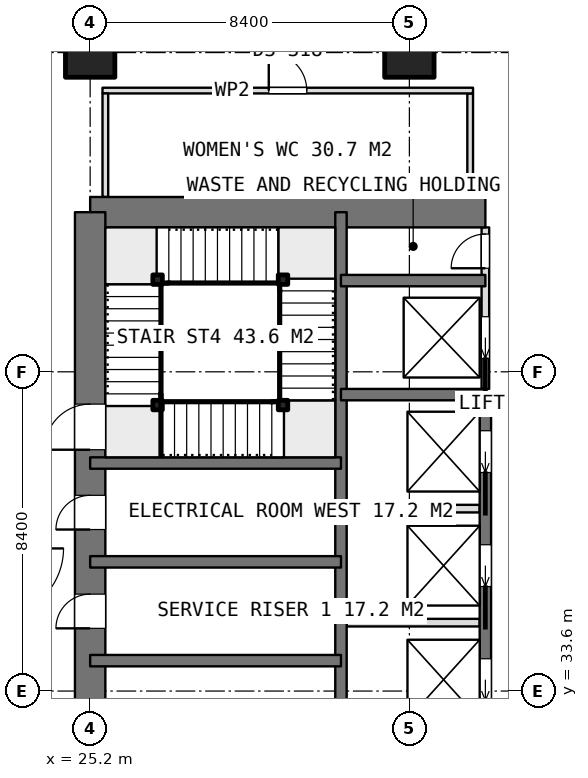
"""IFC4 building model, lengths in metres.
Left out: names, types, materials, properties, quantities, classifications, styles, units other than length and angle.
Written with IfcOpenShell. Run it as: python <this file> out.ifc"""

import sys

from ifc_helpers import new_model, si_unit, direction, frame, frame_2d, origin, origin_2d, place, context, subcontext, project, spatial, rectangle, extrude, element, fill, save


model = new_model("IFC4")
c1 = context("Model", 3, precision=1e-05, world=origin(), true_north=direction((0.0, 1.0)))
c2 = subcontext(c1, "Body", "Model", "MODEL_VIEW")
j1 = project(units=[si_unit("LENGTHUNIT", "METRE"), si_unit("PLANEANGLEUNIT", "RADIAN")], contexts=[c1])
p1 = place(None, origin())
s1 = spatial("IfcSite", under=j1, at=p1, CompositionType="ELEMENT")
p2 = place(p1, origin())
s2 = spatial("IfcBuilding", under=s1, at=p2, CompositionType="ELEMENT")
p3 = place(p2, frame((0.0, 0.0, 291.35)))
s3 = spatial("IfcBuildingStorey", under=s2, at=p3, CompositionType="ELEMENT", Elevation=291.35)
p4 = place(p3, frame((25.2, 46.2, 0.0), z_axis=(0.0, 0.0, 1.0), x_axis=(1.0, 0.0, 0.0)))
e1 = element("IfcWall", 1, at=p4, inside=s3, PredefinedType="SHEAR", context=c2, shape_type="SweptSolid", body=[
    extrude(rectangle(XDim=10.4, YDim=0.8, at=frame_2d((5.2, 0.0))), origin(), (0.0, 0.0, 1.0), 5.4),
])
p5 = place(p3, frame((25.2, 21.0, 0.0), z_axis=(0.0, 0.0, 1.0), x_axis=(0.0, 1.0, 0.0)))
e2 = element("IfcWall", 2, at=p5, inside=s3, PredefinedType="SHEAR", context=c2, shape_type="SweptSolid", body=[
    extrude(rectangle(XDim=25.2, YDim=0.8, at=frame_2d((12.6, 0.0))), origin(), (0.0, 0.0, 1.0), 5.4),
])
p6 = place(p5, frame((7.8, 0.0, 0.0)))
e3 = element("IfcOpeningElement", 3, at=p6, cuts=e2, PredefinedType="OPENING", context=c2, shape_type="SweptSolid", body=[
    extrude(rectangle(XDim=1.2, YDim=2.1, at=frame_2d((0.6, 1.05))), frame((0.0, 0.41, 0.0), z_axis=(0.0, -1.0, 0.0), x_axis=(1.0, 0.0, 0.0)), (0.0, 0.0, 1.0), 0.82),
])
p7 = place(p5, frame((14.25, 0.0, 0.0)))
e4 = element("IfcOpeningElement", 4, at=p7, cuts=e2, PredefinedType="OPENING", context=c2, shape_type="SweptSolid", body=[
    extrude(rectangle(XDim=0.9, YDim=2.1, at=frame_2d((0.45, 1.05))), frame((0.0, 0.41, 0.0), z_axis=(0.0, -1.0, 0.0), x_axis=(1.0, 0.0, 0.0)), (0.0, 0.0, 1.0), 0.82),
])
p8 = place(p5, frame((16.85, 0.0, 0.0)))
e5 = element("IfcOpeningElement", 5, at=p8, cuts=e2, PredefinedType="OPENING", context=c2, shape_type="SweptSolid", body=[
    extrude(rectangle(XDim=0.9, YDim=2.1, at=frame_2d((0.45, 1.05))), frame((0.0, 0.41, 0.0), z_axis=(0.0, -1.0, 0.0), x_axis=(1.0, 0.0, 0.0)), (0.0, 0.0, 1.0), 0.82),
])
p9 = place(p5, frame((18.95, 0.0, 0.0)))
e6 = element("IfcOpeningElement", 6, at=p9, cuts=e2, PredefinedType="OPENING", context=c2, shape_type="SweptSolid", body=[
    extrude(rectangle(XDim=1.2, YDim=2.1, at=frame_2d((0.6, 1.05))), frame((0.0, 0.41, 0.0), z_axis=(0.0, -1.0, 0.0), x_axis=(1.0, 0.0, 0.0)), (0.0, 0.0, 1.0), 0.82),
])
p10 = place(p3, frame((31.8, 21.0, 0.0), z_axis=(0.0, 0.0, 1.0), x_axis=(0.0, 1.0, 0.0)))
e7 = element("IfcWall", 7, at=p10, inside=s3, PredefinedType="SHEAR", context=c2, shape_type="SweptSolid", body=[
    extrude(rectangle(XDim=25.2, YDim=0.3, at=frame_2d((12.6, 0.0))), origin(), (0.0, 0.0, 1.0), 5.4),
])
p11 = place(p3, frame((35.6, 23.4, 0.0), z_axis=(0.0, 0.0, 1.0), x_axis=(0.0, 1.0, 0.0)))
e8 = element("IfcWall", 8, at=p11, inside=s3, PredefinedType="SHEAR", context=c2, shape_type="SweptSolid", body=[
    extrude(rectangle(XDim=18.0, YDim=0.3, at=frame_2d((9.0, 0.0))), origin(), (0.0, 0.0, 1.0), 5.4),
])
p12 = place(p11, frame((0.95, 0.0, 0.0)))
e9 = element("IfcOpeningElement", 9, at=p12, cuts=e8, PredefinedType="OPENING", context=c2, shape_type="SweptSolid", body=[
    extrude(rectangle(XDim=1.1, YDim=2.1, at=frame_2d((0.55, 1.05))), frame((0.0, 0.16, 0.0), z_axis=(0.0, -1.0, 0.0), x_axis=(1.0, 0.0, 0.0)), (0.0, 0.0, 1.0), 0.32),
])
p13 = place(p11, frame((3.95, 0.0, 0.0)))
e10 = element("IfcOpeningElement", 10, at=p13, cuts=e8, PredefinedType="OPENING", context=c2, shape_type="SweptSolid", body=[
    extrude(rectangle(XDim=1.1, YDim=2.1, at=frame_2d((0.55, 1.05))), frame((0.0, 0.16, 0.0), z_axis=(0.0, -1.0, 0.0), x_axis=(1.0, 0.0, 0.0)), (0.0, 0.0, 1.0), 0.32),
])
p14 = place(p11, frame((6.95, 0.0, 0.0)))
e11 = element("IfcOpeningElement", 11, at=p14, cuts=e8, PredefinedType="OPENING", context=c2, shape_type="SweptSolid", body=[
    extrude(rectangle(XDim=1.1, YDim=2.1, at=frame_2d((0.55, 1.05))), frame((0.0, 0.16, 0.0), z_axis=(0.0, -1.0, 0.0), x_axis=(1.0, 0.0, 0.0)), (0.0, 0.0, 1.0), 0.32),
])
p15 = place(p11, frame((9.95, 0.0, 0.0)))
e12 = element("IfcOpeningElement", 12, at=p15, cuts=e8, PredefinedType="OPENING", context=c2, shape_type="SweptSolid", body=[
    extrude(rectangle(XDim=1.1, YDim=2.1, at=frame_2d((0.55, 1.05))), frame((0.0, 0.16, 0.0), z_axis=(0.0, -1.0, 0.0), x_axis=(1.0, 0.0, 0.0)), (0.0, 0.0, 1.0), 0.32),
])
p16 = place(p11, frame((12.95, 0.0, 0.0)))
e13 = element("IfcOpeningElement", 13, at=p16, cuts=e8, PredefinedType="OPENING", context=c2, shape_type="SweptSolid", body=[
    extrude(rectangle(XDim=1.1, YDim=2.1, at=frame_2d((0.55, 1.05))), frame((0.0, 0.16, 0.0), z_axis=(0.0, -1.0, 0.0), x_axis=(1.0, 0.0, 0.0)), (0.0, 0.0, 1.0), 0.32),
])
p17 = place(p11, frame((15.95, 0.0, 0.0)))
e14 = element("IfcOpeningElement", 14, at=p17, cuts=e8, PredefinedType="OPENING", context=c2, shape_type="SweptSolid", body=[
    extrude(rectangle(XDim=1.1, YDim=2.1, at=frame_2d((0.55, 1.05))), frame((0.0, 0.16, 0.0), z_axis=(0.0, -1.0, 0.0), x_axis=(1.0, 0.0, 0.0)), (0.0, 0.0, 1.0), 0.32),
])
for number, where, z_axis, x_axis in (
    (15, (31.8, 41.4, 0.0), (0.0, 0.0, 1.0), (1.0, 0.0, 0.0)),
    (16, (31.8, 44.4, 0.0), (0.0, 0.0, 1.0), (1.0, 0.0, 0.0)),
):
    element("IfcWall", number, at=place(p3, frame(where, z_axis=z_axis, x_axis=x_axis)), inside=s3, PredefinedType="SHEAR", context=c2, shape_type="SweptSolid", body=[
        extrude(rectangle(XDim=3.8, YDim=0.3, at=frame_2d((1.9, 0.0))), origin(), (0.0, 0.0, 1.0), 5.4),
    ])
for number, where, z_axis, x_axis in (
    (17, (25.2, 34.4, 0.0), (0.0, 0.0, 1.0), (1.0, 0.0, 0.0)),
    (18, (25.2, 37.0, 0.0), (0.0, 0.0, 1.0), (1.0, 0.0, 0.0)),
    (19, (25.2, 39.6, 0.0), (0.0, 0.0, 1.0), (1.0, 0.0, 0.0)),
):
    element("IfcWall", number, at=place(p3, frame(where, z_axis=z_axis, x_axis=x_axis)), inside=s3, PredefinedType="SHEAR", context=c2, shape_type="SweptSolid", body=[
        extrude(rectangle(XDim=6.6, YDim=0.3, at=frame_2d((3.3, 0.0))), origin(), (0.0, 0.0, 1.0), 5.4),
    ])
for number, where, z_axis, x_axis in (
    (20, (25.2, 50.4, 0.0), (0.0, 0.0, 1.0), (1.0, 0.0, 0.0)),
    (21, (33.6, 50.4, 0.0), (0.0, 0.0, 1.0), (1.0, 0.0, 0.0)),
):
    element("IfcColumn", number, at=place(p3, frame(where, z_axis=z_axis, x_axis=x_axis)), inside=s3, PredefinedType="COLUMN", context=c2, shape_type="SweptSolid", body=[
        extrude(rectangle(XDim=1.3, YDim=1.3, at=origin_2d()), origin(), (0.0, 0.0, 1.0), 5.4),
    ])
for number, where, z_axis, x_axis in (
    (22, (31.95, 35.4, 0.0), (0.0, 0.0, 1.0), (1.0, 0.0, 0.0)),
    (23, (31.95, 38.4, 0.0), (0.0, 0.0, 1.0), (1.0, 0.0, 0.0)),
):
    element("IfcWall", number, at=place(p3, frame(where, z_axis=z_axis, x_axis=x_axis)), inside=s3, PredefinedType="PARTITIONING", context=c2, shape_type="SweptSolid", body=[
        extrude(rectangle(XDim=3.5, YDim=0.2, at=frame_2d((1.75, 0.0))), origin(), (0.0, 0.0, 1.0), 5.1),
    ])
p18 = place(p3, frame((35.6, 41.55, 0.0), z_axis=(0.0, 0.0, 1.0), x_axis=(0.0, 1.0, 0.0)))
e24 = element("IfcWall", 24, at=p18, inside=s3, PredefinedType="PARTITIONING", context=c2, shape_type="SweptSolid", body=[
    extrude(rectangle(XDim=4.25, YDim=0.2, at=frame_2d((2.125, 0.0))), origin(), (0.0, 0.0, 1.0), 5.1),
])
p19 = place(p18, frame((3.175, 0.0, 0.0)))
e25 = element("IfcOpeningElement", 25, at=p19, cuts=e24, PredefinedType="OPENING", context=c2, shape_type="SweptSolid", body=[
    extrude(rectangle(XDim=0.9, YDim=2.1, at=frame_2d((0.45, 1.05))), frame((0.0, 0.11, 0.0), z_axis=(0.0, -1.0, 0.0), x_axis=(1.0, 0.0, 0.0)), (0.0, 0.0, 1.0), 0.22),
])
p20 = place(p18, frame((0.8, 0.0, 0.0)))
e26 = element("IfcOpeningElement", 26, at=p20, cuts=e24, PredefinedType="OPENING", context=c2, shape_type="SweptSolid", body=[
    extrude(rectangle(XDim=1.1, YDim=2.1, at=frame_2d((0.55, 1.05))), frame((0.0, 0.11, 0.0), z_axis=(0.0, -1.0, 0.0), x_axis=(1.0, 0.0, 0.0)), (0.0, 0.0, 1.0), 0.22),
])
p21 = place(p3, frame((25.525, 49.4, 0.0), z_axis=(0.0, 0.0, 1.0), x_axis=(1.0, 0.0, 0.0)))
e27 = element("IfcWall", 27, at=p21, inside=s3, PredefinedType="PARTITIONING", context=c2, shape_type="SweptSolid", body=[
    extrude(rectangle(XDim=9.75, YDim=0.15, at=frame_2d((4.875, 0.0))), origin(), (0.0, 0.0, 1.0), 5.1),
])
p22 = place(p21, frame((4.375, 0.0, 0.0)))
e28 = element("IfcOpeningElement", 28, at=p22, cuts=e27, PredefinedType="OPENING", context=c2, shape_type="SweptSolid", body=[
    extrude(rectangle(XDim=1.0, YDim=2.1, at=frame_2d((0.5, 1.05))), frame((0.0, 0.085, 0.0), z_axis=(0.0, -1.0, 0.0), x_axis=(1.0, 0.0, 0.0)), (0.0, 0.0, 1.0), 0.17),
])
for number, where, z_axis, x_axis in (
    (29, (25.6, 46.6, 0.0), (0.0, 0.0, 1.0), (0.0, 1.0, 0.0)),
    (30, (35.2, 46.6, 0.0), (0.0, 0.0, 1.0), (0.0, 1.0, 0.0)),
):
    element("IfcWall", number, at=place(p3, frame(where, z_axis=z_axis, x_axis=x_axis)), inside=s3, PredefinedType="PARTITIONING", context=c2, shape_type="SweptSolid", body=[
        extrude(rectangle(XDim=2.725, YDim=0.15, at=frame_2d((1.362, 0.0))), origin(), (0.0, 0.0, 1.0), 5.1),
    ])
for number, where, z_axis, x_axis in (
    (31, (26.975, 41.125, 0.0), (0.0, 0.0, 1.0), (1.0, 0.0, 0.0)),
    (32, (30.275, 41.125, 0.0), (0.0, 0.0, 1.0), (1.0, 0.0, 0.0)),
    (33, (30.275, 44.425, 0.0), (0.0, 0.0, 1.0), (1.0, 0.0, 0.0)),
    (34, (26.975, 44.425, 0.0), (0.0, 0.0, 1.0), (1.0, 0.0, 0.0)),
):
    element("IfcColumn", number, at=place(p3, frame(where, z_axis=z_axis, x_axis=x_axis)), inside=s3, PredefinedType="COLUMN", context=c2, shape_type="SweptSolid", body=[
        extrude(rectangle(XDim=0.25, YDim=0.25, at=origin_2d()), origin(), (0.0, 0.0, 1.0), 5.4),
    ])
p23 = place(p7, origin())
e35 = element("IfcDoor", 35, at=p23, inside=s3, OperationType="SINGLE_SWING_LEFT", PredefinedType="DOOR", context=c2, shape_type="SweptSolid", body=[
    extrude(rectangle(XDim=0.9, YDim=2.1, at=frame_2d((0.45, 1.05))), frame((0.0, 0.025, 0.0), z_axis=(0.0, -1.0, 0.0), x_axis=(1.0, 0.0, 0.0)), (0.0, 0.0, 1.0), 0.05),
])
fill(e4, e35)
p24 = place(p8, origin())
e36 = element("IfcDoor", 36, at=p24, inside=s3, OperationType="SINGLE_SWING_LEFT", PredefinedType="DOOR", context=c2, shape_type="SweptSolid", body=[
    extrude(rectangle(XDim=0.9, YDim=2.1, at=frame_2d((0.45, 1.05))), frame((0.0, 0.025, 0.0), z_axis=(0.0, -1.0, 0.0), x_axis=(1.0, 0.0, 0.0)), (0.0, 0.0, 1.0), 0.05),
])
fill(e5, e36)
p25 = place(p19, origin())
e37 = element("IfcDoor", 37, at=p25, inside=s3, OperationType="SINGLE_SWING_LEFT", PredefinedType="DOOR", context=c2, shape_type="SweptSolid", body=[
    extrude(rectangle(XDim=0.9, YDim=2.1, at=frame_2d((0.45, 1.05))), frame((0.0, 0.025, 0.0), z_axis=(0.0, -1.0, 0.0), x_axis=(1.0, 0.0, 0.0)), (0.0, 0.0, 1.0), 0.05),
])
fill(e25, e37)
p26 = place(p15, origin())
e38 = element("IfcDoor", 38, at=p26, inside=s3, OperationType="SLIDING_TO_LEFT", PredefinedType="USERDEFINED", context=c2, shape_type="SweptSolid", body=[
    extrude(rectangle(XDim=1.1, YDim=2.1, at=frame_2d((0.55, 1.05))), frame((0.0, 0.025, 0.0), z_axis=(0.0, -1.0, 0.0), x_axis=(1.0, 0.0, 0.0)), (0.0, 0.0, 1.0), 0.05),
])
fill(e12, e38)
p27 = place(p16, origin())
e39 = element("IfcDoor", 39, at=p27, inside=s3, OperationType="SLIDING_TO_LEFT", PredefinedType="USERDEFINED", context=c2, shape_type="SweptSolid", body=[
    extrude(rectangle(XDim=1.1, YDim=2.1, at=frame_2d((0.55, 1.05))), frame((0.0, 0.025, 0.0), z_axis=(0.0, -1.0, 0.0), x_axis=(1.0, 0.0, 0.0)), (0.0, 0.0, 1.0), 0.05),
])
fill(e13, e39)
p28 = place(p17, origin())
e40 = element("IfcDoor", 40, at=p28, inside=s3, OperationType="SLIDING_TO_LEFT", PredefinedType="USERDEFINED", context=c2, shape_type="SweptSolid", body=[
    extrude(rectangle(XDim=1.1, YDim=2.1, at=frame_2d((0.55, 1.05))), frame((0.0, 0.025, 0.0), z_axis=(0.0, -1.0, 0.0), x_axis=(1.0, 0.0, 0.0)), (0.0, 0.0, 1.0), 0.05),
])
fill(e14, e40)
p29 = place(p20, origin())
e41 = element("IfcDoor", 41, at=p29, inside=s3, OperationType="SLIDING_TO_LEFT", PredefinedType="USERDEFINED", context=c2, shape_type="SweptSolid", body=[
    extrude(rectangle(XDim=1.1, YDim=2.1, at=frame_2d((0.55, 1.05))), frame((0.0, 0.025, 0.0), z_axis=(0.0, -1.0, 0.0), x_axis=(1.0, 0.0, 0.0)), (0.0, 0.0, 1.0), 0.05),
])
fill(e26, e41)
p30 = place(p22, origin())
e42 = element("IfcDoor", 42, at=p30, inside=s3, OperationType="SINGLE_SWING_LEFT", PredefinedType="DOOR", context=c2, shape_type="SweptSolid", body=[
    extrude(rectangle(XDim=1.0, YDim=2.1, at=frame_2d((0.5, 1.05))), frame((0.0, 0.025, 0.0), z_axis=(0.0, -1.0, 0.0), x_axis=(1.0, 0.0, 0.0)), (0.0, 0.0, 1.0), 0.05),
])
fill(e28, e42)
p31 = place(p9, origin())
e43 = element("IfcDoor", 43, at=p31, inside=s3, OperationType="SINGLE_SWING_RIGHT", PredefinedType="DOOR", context=c2, shape_type="SweptSolid", body=[
    extrude(rectangle(XDim=1.2, YDim=2.1, at=frame_2d((0.6, 1.05))), frame((0.0, 0.025, 0.0), z_axis=(0.0, -1.0, 0.0), x_axis=(1.0, 0.0, 0.0)), (0.0, 0.0, 1.0), 0.05),
])
fill(e6, e43)
save(model, sys.argv[1])
